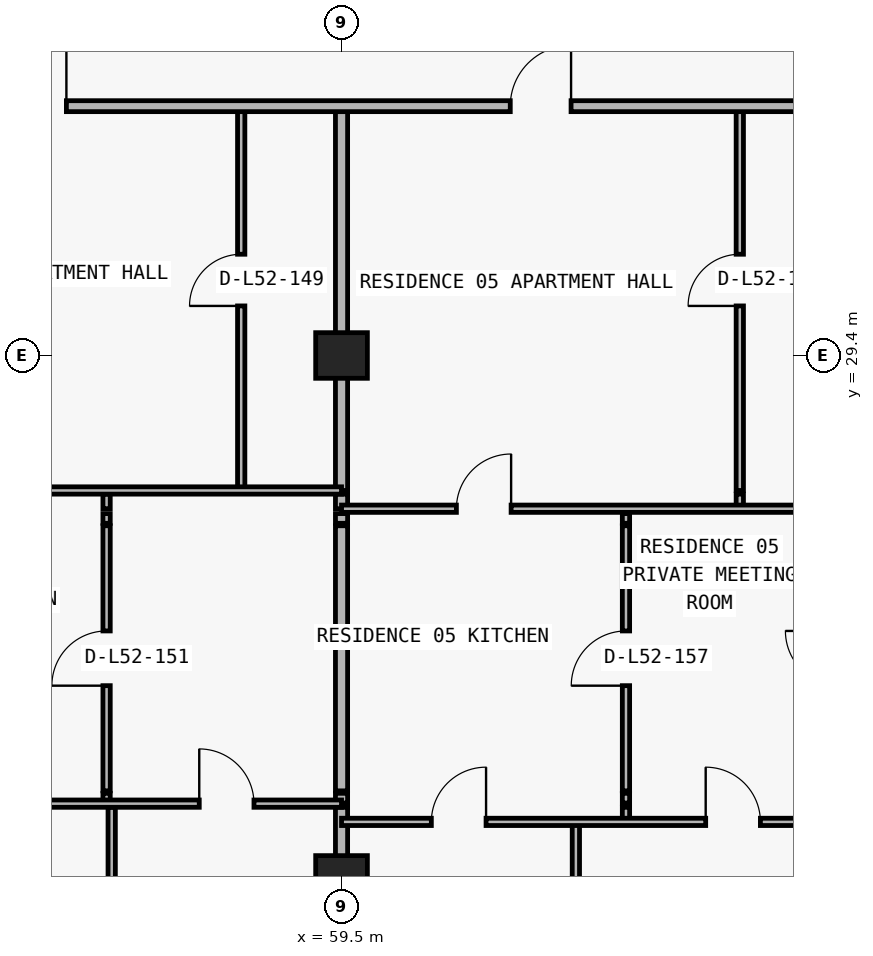
"""IFC4 building model, lengths in metres.
Left out: names, types, materials, properties, quantities, classifications, styles, units other than length and angle.
Written with IfcOpenShell. Run it as: python <this file> out.ifc"""

import sys

from ifc_helpers import new_model, si_unit, direction, frame, frame_2d, origin, origin_2d, place, context, subcontext, project, spatial, rectangle, extrude, element, fill, save


model = new_model("IFC4")
c1 = context("Model", 3, precision=1e-05, world=origin(), true_north=direction((0.0, 1.0)))
c2 = subcontext(c1, "Body", "Model", "MODEL_VIEW")
j1 = project(units=[si_unit("LENGTHUNIT", "METRE"), si_unit("PLANEANGLEUNIT", "RADIAN")], contexts=[c1])
p1 = place(None, origin())
s1 = spatial("IfcSite", under=j1, at=p1, CompositionType="ELEMENT")
p2 = place(p1, origin())
s2 = spatial("IfcBuilding", under=s1, at=p2, CompositionType="ELEMENT")
p3 = place(p2, frame((0.0, 0.0, 188.4)))
s3 = spatial("IfcBuildingStorey", under=s2, at=p3, CompositionType="ELEMENT", Elevation=188.4)
for number, where, z_axis, x_axis in (
    (1, (59.5, 20.8, 0.0), (0.0, 0.0, 1.0), (1.0, 0.0, 0.0)),
    (2, (59.5, 29.4, 0.0), (0.0, 0.0, 1.0), (1.0, 0.0, 0.0)),
):
    element("IfcColumn", number, at=place(p3, frame(where, z_axis=z_axis, x_axis=x_axis)), inside=s3, PredefinedType="COLUMN", context=c2, shape_type="SweptSolid", body=[
        extrude(rectangle(XDim=0.85, YDim=0.75, at=origin_2d()), origin(), (0.0, 0.0, 1.0), 3.05),
    ])
p4 = place(p3, frame((55.636, 22.04, 0.0), z_axis=(0.0, 0.0, 1.0), x_axis=(0.0, 1.0, 0.0)))
e3 = element("IfcWall", 3, at=p4, inside=s3, PredefinedType="PARTITIONING", context=c2, shape_type="SweptSolid", body=[
    extrude(rectangle(XDim=0.16, YDim=0.12, at=frame_2d((0.08, 0.0))), origin(), (0.0, 0.0, 1.0), 3.05),
])
p5 = place(p3, frame((55.636, 22.24, 0.0), z_axis=(0.0, 0.0, 1.0), x_axis=(0.0, 1.0, 0.0)))
e4 = element("IfcWall", 4, at=p5, inside=s3, PredefinedType="PARTITIONING", context=c2, shape_type="SweptSolid", body=[
    extrude(rectangle(XDim=4.36, YDim=0.12, at=frame_2d((2.18, 0.0))), origin(), (0.0, 0.0, 1.0), 3.05),
])
p6 = place(p5, frame((1.73, 0.0, 0.0)))
e5 = element("IfcOpeningElement", 5, at=p6, cuts=e4, PredefinedType="OPENING", context=c2, shape_type="SweptSolid", body=[
    extrude(rectangle(XDim=0.9, YDim=2.15, at=frame_2d((0.45, 1.075))), frame((0.0, 0.07, 0.0), z_axis=(0.0, -1.0, 0.0), x_axis=(1.0, 0.0, 0.0)), (0.0, 0.0, 1.0), 0.14),
])
p7 = place(p3, frame((55.636, 26.64, 0.0), z_axis=(0.0, 0.0, 1.0), x_axis=(0.0, 1.0, 0.0)))
e6 = element("IfcWall", 6, at=p7, inside=s3, PredefinedType="PARTITIONING", context=c2, shape_type="SweptSolid", body=[
    extrude(rectangle(XDim=0.16, YDim=0.12, at=frame_2d((0.08, 0.0))), origin(), (0.0, 0.0, 1.0), 3.05),
])
p8 = place(p3, frame((55.636, 26.88, 0.0), z_axis=(0.0, 0.0, 1.0), x_axis=(0.0, 1.0, 0.0)))
e7 = element("IfcWall", 7, at=p8, inside=s3, PredefinedType="PARTITIONING", context=c2, shape_type="SweptSolid", body=[
    extrude(rectangle(XDim=0.24, YDim=0.12, at=frame_2d((0.12, 0.0))), origin(), (0.0, 0.0, 1.0), 3.05),
])
p9 = place(p3, frame((55.72, 11.24, 0.0), z_axis=(0.0, 0.0, 1.0), x_axis=(0.0, 1.0, 0.0)))
e8 = element("IfcWall", 8, at=p9, inside=s3, PredefinedType="PARTITIONING", context=c2, shape_type="SweptSolid", body=[
    extrude(rectangle(XDim=10.73, YDim=0.12, at=frame_2d((5.365, 0.0))), origin(), (0.0, 0.0, 1.0), 3.05),
])
p10 = place(p3, frame((57.85, 27.18, 0.0), z_axis=(0.0, 0.0, 1.0), x_axis=(0.0, 1.0, 0.0)))
e9 = element("IfcWall", 9, at=p10, inside=s3, PredefinedType="PARTITIONING", context=c2, shape_type="SweptSolid", body=[
    extrude(rectangle(XDim=6.32, YDim=0.12, at=frame_2d((3.16, 0.0))), origin(), (0.0, 0.0, 1.0), 3.05),
])
p11 = place(p10, frame((3.035, 0.0, 0.0)))
e10 = element("IfcOpeningElement", 10, at=p11, cuts=e9, PredefinedType="OPENING", context=c2, shape_type="SweptSolid", body=[
    extrude(rectangle(XDim=0.85, YDim=2.1, at=frame_2d((0.425, 1.05))), frame((0.0, 0.07, 0.0), z_axis=(0.0, -1.0, 0.0), x_axis=(1.0, 0.0, 0.0)), (0.0, 0.0, 1.0), 0.14),
])
p12 = place(p3, frame((59.5, 11.24, 0.0), z_axis=(0.0, 0.0, 1.0), x_axis=(0.0, 1.0, 0.0)))
e11 = element("IfcWall", 11, at=p12, inside=s3, PredefinedType="PARTITIONING", context=c2, shape_type="SweptSolid", body=[
    extrude(rectangle(XDim=10.73, YDim=0.2, at=frame_2d((5.365, 0.0))), origin(), (0.0, 0.0, 1.0), 2.263),
])
p13 = place(p3, frame((59.5, 22.04, 0.0), z_axis=(0.0, 0.0, 1.0), x_axis=(0.0, 1.0, 0.0)))
e12 = element("IfcWall", 12, at=p13, inside=s3, PredefinedType="PARTITIONING", context=c2, shape_type="SweptSolid", body=[
    extrude(rectangle(XDim=0.16, YDim=0.2, at=frame_2d((0.08, 0.0))), origin(), (0.0, 0.0, 1.0), 2.263),
])
p14 = place(p3, frame((59.5, 22.24, 0.0), z_axis=(0.0, 0.0, 1.0), x_axis=(0.0, 1.0, 0.0)))
e13 = element("IfcWall", 13, at=p14, inside=s3, PredefinedType="PARTITIONING", context=c2, shape_type="SweptSolid", body=[
    extrude(rectangle(XDim=4.36, YDim=0.2, at=frame_2d((2.18, 0.0))), origin(), (0.0, 0.0, 1.0), 2.263),
])
p15 = place(p3, frame((59.5, 26.64, 0.0), z_axis=(0.0, 0.0, 1.0), x_axis=(0.0, 1.0, 0.0)))
e14 = element("IfcWall", 14, at=p15, inside=s3, PredefinedType="PARTITIONING", context=c2, shape_type="SweptSolid", body=[
    extrude(rectangle(XDim=0.16, YDim=0.2, at=frame_2d((0.08, 0.0))), origin(), (0.0, 0.0, 1.0), 2.263),
])
p16 = place(p3, frame((59.5, 26.88, 0.0), z_axis=(0.0, 0.0, 1.0), x_axis=(0.0, 1.0, 0.0)))
e15 = element("IfcWall", 15, at=p16, inside=s3, PredefinedType="PARTITIONING", context=c2, shape_type="SweptSolid", body=[
    extrude(rectangle(XDim=0.24, YDim=0.2, at=frame_2d((0.12, 0.0))), origin(), (0.0, 0.0, 1.0), 2.263),
])
p17 = place(p3, frame((59.5, 27.18, 0.0), z_axis=(0.0, 0.0, 1.0), x_axis=(0.0, 1.0, 0.0)))
e16 = element("IfcWall", 16, at=p17, inside=s3, PredefinedType="PARTITIONING", context=c2, shape_type="SweptSolid", body=[
    extrude(rectangle(XDim=6.32, YDim=0.2, at=frame_2d((3.16, 0.0))), origin(), (0.0, 0.0, 1.0), 2.263),
])
p18 = place(p3, frame((63.354, 11.24, 0.0), z_axis=(0.0, 0.0, 1.0), x_axis=(0.0, 1.0, 0.0)))
e17 = element("IfcWall", 17, at=p18, inside=s3, PredefinedType="PARTITIONING", context=c2, shape_type="SweptSolid", body=[
    extrude(rectangle(XDim=10.49, YDim=0.12, at=frame_2d((5.245, 0.0))), origin(), (0.0, 0.0, 1.0), 3.05),
])
p19 = place(p3, frame((64.178, 21.73, 0.0), z_axis=(0.0, 0.0, 1.0), x_axis=(0.0, 1.0, 0.0)))
e18 = element("IfcWall", 18, at=p19, inside=s3, PredefinedType="PARTITIONING", context=c2, shape_type="SweptSolid", body=[
    extrude(rectangle(XDim=0.24, YDim=0.12, at=frame_2d((0.12, 0.0))), origin(), (0.0, 0.0, 1.0), 3.05),
])
p20 = place(p3, frame((64.178, 22.04, 0.0), z_axis=(0.0, 0.0, 1.0), x_axis=(0.0, 1.0, 0.0)))
e19 = element("IfcWall", 19, at=p20, inside=s3, PredefinedType="PARTITIONING", context=c2, shape_type="SweptSolid", body=[
    extrude(rectangle(XDim=0.16, YDim=0.12, at=frame_2d((0.08, 0.0))), origin(), (0.0, 0.0, 1.0), 3.05),
])
p21 = place(p3, frame((64.178, 22.24, 0.0), z_axis=(0.0, 0.0, 1.0), x_axis=(0.0, 1.0, 0.0)))
e20 = element("IfcWall", 20, at=p21, inside=s3, PredefinedType="PARTITIONING", context=c2, shape_type="SweptSolid", body=[
    extrude(rectangle(XDim=4.36, YDim=0.12, at=frame_2d((2.18, 0.0))), origin(), (0.0, 0.0, 1.0), 3.05),
])
p22 = place(p21, frame((1.73, 0.0, 0.0)))
e21 = element("IfcOpeningElement", 21, at=p22, cuts=e20, PredefinedType="OPENING", context=c2, shape_type="SweptSolid", body=[
    extrude(rectangle(XDim=0.9, YDim=2.15, at=frame_2d((0.45, 1.075))), frame((0.0, 0.07, 0.0), z_axis=(0.0, -1.0, 0.0), x_axis=(1.0, 0.0, 0.0)), (0.0, 0.0, 1.0), 0.14),
])
p23 = place(p3, frame((64.178, 26.64, 0.0), z_axis=(0.0, 0.0, 1.0), x_axis=(0.0, 1.0, 0.0)))
e22 = element("IfcWall", 22, at=p23, inside=s3, PredefinedType="PARTITIONING", context=c2, shape_type="SweptSolid", body=[
    extrude(rectangle(XDim=0.16, YDim=0.12, at=frame_2d((0.08, 0.0))), origin(), (0.0, 0.0, 1.0), 3.05),
])
p24 = place(p3, frame((66.05, 26.88, 0.0), z_axis=(0.0, 0.0, 1.0), x_axis=(0.0, 1.0, 0.0)))
e23 = element("IfcWall", 23, at=p24, inside=s3, PredefinedType="PARTITIONING", context=c2, shape_type="SweptSolid", body=[
    extrude(rectangle(XDim=0.24, YDim=0.12, at=frame_2d((0.12, 0.0))), origin(), (0.0, 0.0, 1.0), 3.05),
])
p25 = place(p3, frame((66.05, 27.18, 0.0), z_axis=(0.0, 0.0, 1.0), x_axis=(0.0, 1.0, 0.0)))
e24 = element("IfcWall", 24, at=p25, inside=s3, PredefinedType="PARTITIONING", context=c2, shape_type="SweptSolid", body=[
    extrude(rectangle(XDim=6.32, YDim=0.12, at=frame_2d((3.16, 0.0))), origin(), (0.0, 0.0, 1.0), 3.05),
])
p26 = place(p25, frame((3.035, 0.0, 0.0)))
e25 = element("IfcOpeningElement", 25, at=p26, cuts=e24, PredefinedType="OPENING", context=c2, shape_type="SweptSolid", body=[
    extrude(rectangle(XDim=0.85, YDim=2.1, at=frame_2d((0.425, 1.05))), frame((0.0, 0.07, 0.0), z_axis=(0.0, -1.0, 0.0), x_axis=(1.0, 0.0, 0.0)), (0.0, 0.0, 1.0), 0.14),
])
p27 = place(p3, frame((59.5, 21.73, 0.0), z_axis=(0.0, 0.0, 1.0), x_axis=(1.0, 0.0, 0.0)))
e26 = element("IfcWall", 26, at=p27, inside=s3, PredefinedType="PARTITIONING", context=c2, shape_type="SweptSolid", body=[
    extrude(rectangle(XDim=8.2, YDim=0.12, at=frame_2d((4.1, 0.0))), origin(), (0.0, 0.0, 1.0), 3.05),
])
p28 = place(p27, frame((1.477, 0.0, 0.0)))
e27 = element("IfcOpeningElement", 27, at=p28, cuts=e26, PredefinedType="OPENING", context=c2, shape_type="SweptSolid", body=[
    extrude(rectangle(XDim=0.9, YDim=2.15, at=frame_2d((0.45, 1.075))), frame((0.0, 0.07, 0.0), z_axis=(0.0, -1.0, 0.0), x_axis=(1.0, 0.0, 0.0)), (0.0, 0.0, 1.0), 0.14),
])
p29 = place(p27, frame((5.989, 0.0, 0.0)))
e28 = element("IfcOpeningElement", 28, at=p29, cuts=e26, PredefinedType="OPENING", context=c2, shape_type="SweptSolid", body=[
    extrude(rectangle(XDim=0.9, YDim=2.15, at=frame_2d((0.45, 1.075))), frame((0.0, 0.07, 0.0), z_axis=(0.0, -1.0, 0.0), x_axis=(1.0, 0.0, 0.0)), (0.0, 0.0, 1.0), 0.14),
])
p30 = place(p3, frame((51.32, 22.03, 0.0), z_axis=(0.0, 0.0, 1.0), x_axis=(1.0, 0.0, 0.0)))
e29 = element("IfcWall", 29, at=p30, inside=s3, PredefinedType="PARTITIONING", context=c2, shape_type="SweptSolid", body=[
    extrude(rectangle(XDim=8.18, YDim=0.12, at=frame_2d((4.09, 0.0))), origin(), (0.0, 0.0, 1.0), 3.05),
])
p31 = place(p30, frame((1.708, 0.0, 0.0)))
e30 = element("IfcOpeningElement", 30, at=p31, cuts=e29, PredefinedType="OPENING", context=c2, shape_type="SweptSolid", body=[
    extrude(rectangle(XDim=0.9, YDim=2.15, at=frame_2d((0.45, 1.075))), frame((0.0, 0.07, 0.0), z_axis=(0.0, -1.0, 0.0), x_axis=(1.0, 0.0, 0.0)), (0.0, 0.0, 1.0), 0.14),
])
p32 = place(p30, frame((5.84, 0.0, 0.0)))
e31 = element("IfcOpeningElement", 31, at=p32, cuts=e29, PredefinedType="OPENING", context=c2, shape_type="SweptSolid", body=[
    extrude(rectangle(XDim=0.9, YDim=2.15, at=frame_2d((0.45, 1.075))), frame((0.0, 0.07, 0.0), z_axis=(0.0, -1.0, 0.0), x_axis=(1.0, 0.0, 0.0)), (0.0, 0.0, 1.0), 0.14),
])
p33 = place(p3, frame((59.5, 26.88, 0.0), z_axis=(0.0, 0.0, 1.0), x_axis=(1.0, 0.0, 0.0)))
e32 = element("IfcWall", 32, at=p33, inside=s3, PredefinedType="PARTITIONING", context=c2, shape_type="SweptSolid", body=[
    extrude(rectangle(XDim=8.2, YDim=0.12, at=frame_2d((4.1, 0.0))), origin(), (0.0, 0.0, 1.0), 3.05),
])
p34 = place(p33, frame((1.889, 0.0, 0.0)))
e33 = element("IfcOpeningElement", 33, at=p34, cuts=e32, PredefinedType="OPENING", context=c2, shape_type="SweptSolid", body=[
    extrude(rectangle(XDim=0.9, YDim=2.15, at=frame_2d((0.45, 1.075))), frame((0.0, 0.07, 0.0), z_axis=(0.0, -1.0, 0.0), x_axis=(1.0, 0.0, 0.0)), (0.0, 0.0, 1.0), 0.14),
])
p35 = place(p3, frame((51.32, 27.18, 0.0), z_axis=(0.0, 0.0, 1.0), x_axis=(1.0, 0.0, 0.0)))
e34 = element("IfcWall", 34, at=p35, inside=s3, PredefinedType="PARTITIONING", context=c2, shape_type="SweptSolid", body=[
    extrude(rectangle(XDim=8.18, YDim=0.12, at=frame_2d((4.09, 0.0))), origin(), (0.0, 0.0, 1.0), 3.05),
])
p36 = place(p35, frame((1.708, 0.0, 0.0)))
e35 = element("IfcOpeningElement", 35, at=p36, cuts=e34, PredefinedType="OPENING", context=c2, shape_type="SweptSolid", body=[
    extrude(rectangle(XDim=0.9, YDim=2.15, at=frame_2d((0.45, 1.075))), frame((0.0, 0.07, 0.0), z_axis=(0.0, -1.0, 0.0), x_axis=(1.0, 0.0, 0.0)), (0.0, 0.0, 1.0), 0.14),
])
p37 = place(p3, frame((31.4, 33.5, 0.0), z_axis=(0.0, 0.0, 1.0), x_axis=(1.0, 0.0, 0.0)))
e36 = element("IfcWall", 36, at=p37, inside=s3, PredefinedType="PARTITIONING", context=c2, shape_type="SweptSolid", body=[
    extrude(rectangle(XDim=36.3, YDim=0.18, at=frame_2d((18.15, 0.0))), origin(), (0.0, 0.0, 1.0), 3.05),
])
p38 = place(p37, frame((6.231, 0.0, 0.0)))
e37 = element("IfcOpeningElement", 37, at=p38, cuts=e36, PredefinedType="OPENING", context=c2, shape_type="SweptSolid", body=[
    extrude(rectangle(XDim=1.0, YDim=2.2, at=frame_2d((0.5, 1.1))), frame((0.0, 0.1, 0.0), z_axis=(0.0, -1.0, 0.0), x_axis=(1.0, 0.0, 0.0)), (0.0, 0.0, 1.0), 0.2),
])
p39 = place(p37, frame((22.575, 0.0, 0.0)))
e38 = element("IfcOpeningElement", 38, at=p39, cuts=e36, PredefinedType="OPENING", context=c2, shape_type="SweptSolid", body=[
    extrude(rectangle(XDim=1.0, YDim=2.2, at=frame_2d((0.5, 1.1))), frame((0.0, 0.1, 0.0), z_axis=(0.0, -1.0, 0.0), x_axis=(1.0, 0.0, 0.0)), (0.0, 0.0, 1.0), 0.2),
])
p40 = place(p37, frame((30.875, 0.0, 0.0)))
e39 = element("IfcOpeningElement", 39, at=p40, cuts=e36, PredefinedType="OPENING", context=c2, shape_type="SweptSolid", body=[
    extrude(rectangle(XDim=1.0, YDim=2.2, at=frame_2d((0.5, 1.1))), frame((0.0, 0.1, 0.0), z_axis=(0.0, -1.0, 0.0), x_axis=(1.0, 0.0, 0.0)), (0.0, 0.0, 1.0), 0.2),
])
p41 = place(p39, origin())
e40 = element("IfcDoor", 40, at=p41, inside=s3, OperationType="SINGLE_SWING_RIGHT", PredefinedType="DOOR", context=c2, shape_type="SweptSolid", body=[
    extrude(rectangle(XDim=1.0, YDim=2.2, at=frame_2d((0.5, 1.1))), frame((0.0, 0.025, 0.0), z_axis=(0.0, -1.0, 0.0), x_axis=(1.0, 0.0, 0.0)), (0.0, 0.0, 1.0), 0.05),
])
fill(e38, e40)
p42 = place(p11, origin())
e41 = element("IfcDoor", 41, at=p42, inside=s3, OperationType="SINGLE_SWING_LEFT", PredefinedType="DOOR", context=c2, shape_type="SweptSolid", body=[
    extrude(rectangle(XDim=0.85, YDim=2.1, at=frame_2d((0.425, 1.05))), frame((0.0, 0.025, 0.0), z_axis=(0.0, -1.0, 0.0), x_axis=(1.0, 0.0, 0.0)), (0.0, 0.0, 1.0), 0.05),
])
fill(e10, e41)
p43 = place(p6, origin())
e42 = element("IfcDoor", 42, at=p43, inside=s3, OperationType="SINGLE_SWING_LEFT", PredefinedType="DOOR", context=c2, shape_type="SweptSolid", body=[
    extrude(rectangle(XDim=0.9, YDim=2.15, at=frame_2d((0.45, 1.075))), frame((0.0, 0.025, 0.0), z_axis=(0.0, -1.0, 0.0), x_axis=(1.0, 0.0, 0.0)), (0.0, 0.0, 1.0), 0.05),
])
fill(e5, e42)
p44 = place(p32, origin())
e43 = element("IfcDoor", 43, at=p44, inside=s3, OperationType="SINGLE_SWING_LEFT", PredefinedType="DOOR", context=c2, shape_type="SweptSolid", body=[
    extrude(rectangle(XDim=0.9, YDim=2.15, at=frame_2d((0.45, 1.075))), frame((0.0, 0.025, 0.0), z_axis=(0.0, -1.0, 0.0), x_axis=(1.0, 0.0, 0.0)), (0.0, 0.0, 1.0), 0.05),
])
fill(e31, e43)
p45 = place(p40, origin())
e44 = element("IfcDoor", 44, at=p45, inside=s3, OperationType="SINGLE_SWING_RIGHT", PredefinedType="DOOR", context=c2, shape_type="SweptSolid", body=[
    extrude(rectangle(XDim=1.0, YDim=2.2, at=frame_2d((0.5, 1.1))), frame((0.0, 0.025, 0.0), z_axis=(0.0, -1.0, 0.0), x_axis=(1.0, 0.0, 0.0)), (0.0, 0.0, 1.0), 0.05),
])
fill(e39, e44)
p46 = place(p26, origin())
e45 = element("IfcDoor", 45, at=p46, inside=s3, OperationType="SINGLE_SWING_LEFT", PredefinedType="DOOR", context=c2, shape_type="SweptSolid", body=[
    extrude(rectangle(XDim=0.85, YDim=2.1, at=frame_2d((0.425, 1.05))), frame((0.0, 0.025, 0.0), z_axis=(0.0, -1.0, 0.0), x_axis=(1.0, 0.0, 0.0)), (0.0, 0.0, 1.0), 0.05),
])
fill(e25, e45)
p47 = place(p34, origin())
e46 = element("IfcDoor", 46, at=p47, inside=s3, OperationType="SINGLE_SWING_RIGHT", PredefinedType="DOOR", context=c2, shape_type="SweptSolid", body=[
    extrude(rectangle(XDim=0.9, YDim=2.15, at=frame_2d((0.45, 1.075))), frame((0.0, 0.025, 0.0), z_axis=(0.0, -1.0, 0.0), x_axis=(1.0, 0.0, 0.0)), (0.0, 0.0, 1.0), 0.05),
])
fill(e33, e46)
p48 = place(p22, origin())
e47 = element("IfcDoor", 47, at=p48, inside=s3, OperationType="SINGLE_SWING_LEFT", PredefinedType="DOOR", context=c2, shape_type="SweptSolid", body=[
    extrude(rectangle(XDim=0.9, YDim=2.15, at=frame_2d((0.45, 1.075))), frame((0.0, 0.025, 0.0), z_axis=(0.0, -1.0, 0.0), x_axis=(1.0, 0.0, 0.0)), (0.0, 0.0, 1.0), 0.05),
])
fill(e21, e47)
p49 = place(p28, origin())
e48 = element("IfcDoor", 48, at=p49, inside=s3, OperationType="SINGLE_SWING_RIGHT", PredefinedType="DOOR", context=c2, shape_type="SweptSolid", body=[
    extrude(rectangle(XDim=0.9, YDim=2.15, at=frame_2d((0.45, 1.075))), frame((0.0, 0.025, 0.0), z_axis=(0.0, -1.0, 0.0), x_axis=(1.0, 0.0, 0.0)), (0.0, 0.0, 1.0), 0.05),
])
fill(e27, e48)
p50 = place(p29, origin())
e49 = element("IfcDoor", 49, at=p50, inside=s3, OperationType="SINGLE_SWING_LEFT", PredefinedType="DOOR", context=c2, shape_type="SweptSolid", body=[
    extrude(rectangle(XDim=0.9, YDim=2.15, at=frame_2d((0.45, 1.075))), frame((0.0, 0.025, 0.0), z_axis=(0.0, -1.0, 0.0), x_axis=(1.0, 0.0, 0.0)), (0.0, 0.0, 1.0), 0.05),
])
fill(e28, e49)
save(model, sys.argv[1])
